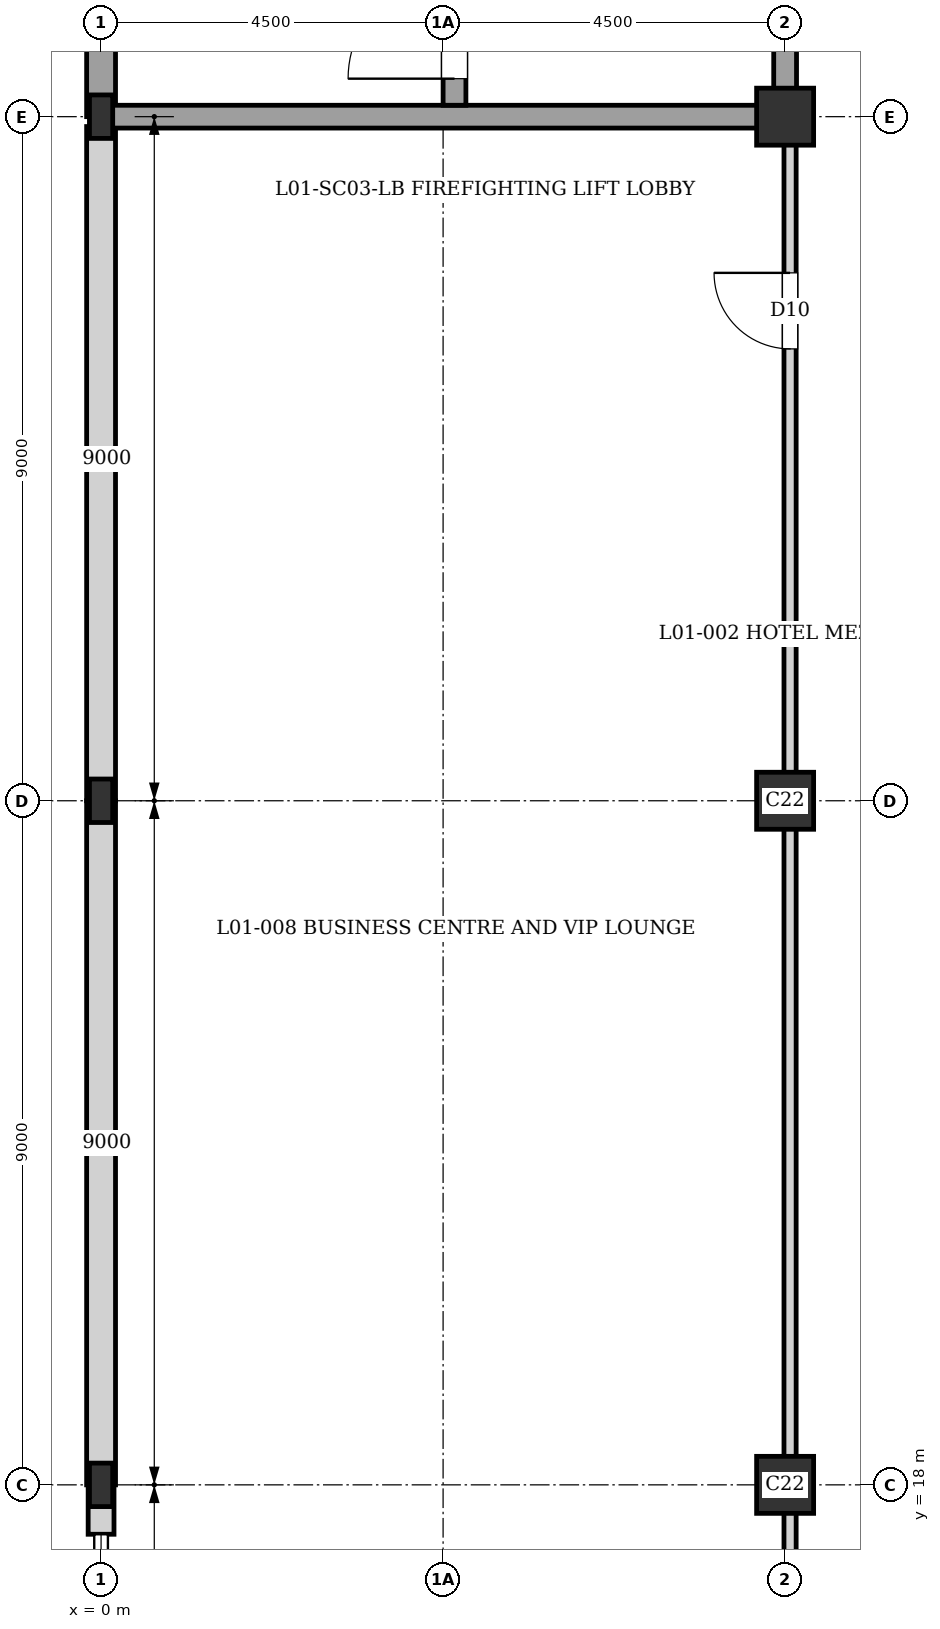
"""IFC4 building model, lengths in metres.
Left out: names, types, materials, properties, quantities, classifications, styles, units other than length and angle.
Written with IfcOpenShell. Run it as: python <this file> out.ifc"""

import sys

from ifc_helpers import new_model, si_unit, direction, frame, frame_2d, origin, origin_2d, place, context, subcontext, project, spatial, rectangle, i_section, extrude, element, fill, save


model = new_model("IFC4")
c1 = context("Model", 3, precision=1e-05, world=origin(), true_north=direction((0.0, 1.0)))
c2 = subcontext(c1, "Body", "Model", "MODEL_VIEW")
j1 = project(units=[si_unit("LENGTHUNIT", "METRE"), si_unit("PLANEANGLEUNIT", "RADIAN")], contexts=[c1])
p1 = place(None, origin())
s1 = spatial("IfcSite", under=j1, at=p1, CompositionType="ELEMENT")
p2 = place(p1, origin())
s2 = spatial("IfcBuilding", under=s1, at=p2, CompositionType="ELEMENT")
p3 = place(p2, frame((0.0, 0.0, 4.32)))
s3 = spatial("IfcBuildingStorey", under=s2, at=p3, CompositionType="ELEMENT", Elevation=4.32)
for number, where, z_axis, x_axis in (
    (1, (0.0, 18.0, 0.0), (0.0, 0.0, 1.0), (1.0, 0.0, 0.0)),
    (2, (0.0, 27.0, 0.0), (0.0, 0.0, 1.0), (1.0, 0.0, 0.0)),
    (3, (0.0, 36.0, 0.0), (0.0, 0.0, 1.0), (1.0, 0.0, 0.0)),
):
    element("IfcColumn", number, at=place(p3, frame(where, z_axis=z_axis, x_axis=x_axis)), inside=s3, PredefinedType="COLUMN", context=c2, shape_type="SweptSolid", body=[
        extrude(i_section(OverallWidth=0.306, OverallDepth=0.572, WebThickness=0.021, FlangeThickness=0.04, at=origin_2d()), origin(), (0.0, 0.0, 1.0), 3.84),
    ])
for number, where, z_axis, x_axis in (
    (4, (9.0, 18.0, 0.0), (0.0, 0.0, 1.0), (1.0, 0.0, 0.0)),
    (5, (9.0, 27.0, 0.0), (0.0, 0.0, 1.0), (1.0, 0.0, 0.0)),
    (6, (9.0, 36.0, 0.0), (0.0, 0.0, 1.0), (1.0, 0.0, 0.0)),
):
    element("IfcColumn", number, at=place(p3, frame(where, z_axis=z_axis, x_axis=x_axis)), inside=s3, PredefinedType="COLUMN", context=c2, shape_type="SweptSolid", body=[
        extrude(rectangle(XDim=0.75, YDim=0.75, at=origin_2d()), origin(), (0.0, 0.0, 1.0), 3.84),
    ])
p4 = place(p3, frame((0.0, 17.35, 0.0), z_axis=(0.0, 0.0, 1.0), x_axis=(0.0, 1.0, 0.0)))
e7 = element("IfcWall", 7, at=p4, inside=s3, PredefinedType="SOLIDWALL", context=c2, shape_type="SweptSolid", body=[
    extrude(rectangle(XDim=0.65, YDim=0.34, at=frame_2d((0.325, 0.0))), origin(), (0.0, 0.0, 1.0), 3.28),
])
p5 = place(p3, frame((0.0, 18.0, 0.0), z_axis=(0.0, 0.0, 1.0), x_axis=(0.0, 1.0, 0.0)))
e8 = element("IfcWall", 8, at=p5, inside=s3, PredefinedType="SOLIDWALL", context=c2, shape_type="SweptSolid", body=[
    extrude(rectangle(XDim=9.0, YDim=0.38, at=frame_2d((4.5, 0.0))), origin(), (0.0, 0.0, 1.0), 1.98),
])
p6 = place(p3, frame((0.0, 27.0, 0.0), z_axis=(0.0, 0.0, 1.0), x_axis=(0.0, 1.0, 0.0)))
e9 = element("IfcWall", 9, at=p6, inside=s3, PredefinedType="SOLIDWALL", context=c2, shape_type="SweptSolid", body=[
    extrude(rectangle(XDim=8.87, YDim=0.38, at=frame_2d((4.435, 0.0))), origin(), (0.0, 0.0, 1.0), 1.98),
])
p7 = place(p3, frame((0.0, 36.0, 0.0), z_axis=(0.0, 0.0, 1.0), x_axis=(0.0, 1.0, 0.0)))
e10 = element("IfcWall", 10, at=p7, inside=s3, PredefinedType="SOLIDWALL", context=c2, shape_type="SweptSolid", body=[
    extrude(rectangle(XDim=9.0, YDim=0.38, at=frame_2d((4.5, 0.0))), origin(), (0.0, 0.0, 1.0), 3.6),
])
p8 = place(p3, frame((0.0, 36.0, 0.0), z_axis=(0.0, 0.0, 1.0), x_axis=(1.0, 0.0, 0.0)))
e11 = element("IfcWall", 11, at=p8, inside=s3, PredefinedType="SHEAR", context=c2, shape_type="SweptSolid", body=[
    extrude(rectangle(XDim=9.0, YDim=0.3, at=frame_2d((4.5, 0.0))), origin(), (0.0, 0.0, 1.0), 3.6),
])
p9 = place(p3, frame((9.0, 36.0, 0.0), z_axis=(0.0, 0.0, 1.0), x_axis=(0.0, 1.0, 0.0)))
e12 = element("IfcWall", 12, at=p9, inside=s3, PredefinedType="SHEAR", context=c2, shape_type="SweptSolid", body=[
    extrude(rectangle(XDim=9.0, YDim=0.3, at=frame_2d((4.5, 0.0))), origin(), (0.0, 0.0, 1.0), 3.6),
])
p10 = place(p9, frame((1.95, 0.0, 0.0)))
e13 = element("IfcOpeningElement", 13, at=p10, cuts=e12, PredefinedType="OPENING", context=c2, shape_type="SweptSolid", body=[
    extrude(rectangle(XDim=1.6, YDim=2.1, at=frame_2d((0.8, 1.05))), frame((0.0, 0.16, 0.0), z_axis=(0.0, -1.0, 0.0), x_axis=(1.0, 0.0, 0.0)), (0.0, 0.0, 1.0), 0.32),
])
p11 = place(p3, frame((4.65, 36.15, 0.0), z_axis=(0.0, 0.0, 1.0), x_axis=(0.0, 1.0, 0.0)))
e14 = element("IfcWall", 14, at=p11, inside=s3, PredefinedType="SHEAR", context=c2, shape_type="SweptSolid", body=[
    extrude(rectangle(XDim=8.7, YDim=0.3, at=frame_2d((4.35, 0.0))), origin(), (0.0, 0.0, 1.0), 3.6),
])
p12 = place(p11, frame((0.35, 0.0, 0.0)))
e15 = element("IfcOpeningElement", 15, at=p12, cuts=e14, PredefinedType="OPENING", context=c2, shape_type="SweptSolid", body=[
    extrude(rectangle(XDim=1.4, YDim=2.02, at=frame_2d((0.7, 1.01))), frame((0.0, 0.16, 0.0), z_axis=(0.0, -1.0, 0.0), x_axis=(1.0, 0.0, 0.0)), (0.0, 0.0, 1.0), 0.32),
])
p13 = place(p3, frame((9.065, 12.305, 0.0), z_axis=(0.0, 0.0, 1.0), x_axis=(0.0, 1.0, 0.0)))
e16 = element("IfcWall", 16, at=p13, inside=s3, PredefinedType="PARTITIONING", context=c2, shape_type="SweptSolid", body=[
    extrude(rectangle(XDim=5.425, YDim=0.16, at=frame_2d((2.712, 0.0))), origin(), (0.0, 0.0, 1.0), 2.99),
])
p14 = place(p13, frame((1.562, 0.0, 0.0)))
e17 = element("IfcOpeningElement", 17, at=p14, cuts=e16, PredefinedType="OPENING", context=c2, shape_type="SweptSolid", body=[
    extrude(rectangle(XDim=1.0, YDim=2.1, at=frame_2d((0.5, 1.05))), frame((0.0, 0.09, 0.0), z_axis=(0.0, -1.0, 0.0), x_axis=(1.0, 0.0, 0.0)), (0.0, 0.0, 1.0), 0.18),
])
p15 = place(p3, frame((9.065, 18.07, 0.0), z_axis=(0.0, 0.0, 1.0), x_axis=(0.0, 1.0, 0.0)))
e18 = element("IfcWall", 18, at=p15, inside=s3, PredefinedType="PARTITIONING", context=c2, shape_type="SweptSolid", body=[
    extrude(rectangle(XDim=8.95, YDim=0.16, at=frame_2d((4.475, 0.0))), origin(), (0.0, 0.0, 1.0), 2.89),
])
p16 = place(p3, frame((9.065, 27.02, 0.0), z_axis=(0.0, 0.0, 1.0), x_axis=(0.0, 1.0, 0.0)))
e19 = element("IfcWall", 19, at=p16, inside=s3, PredefinedType="PARTITIONING", context=c2, shape_type="SweptSolid", body=[
    extrude(rectangle(XDim=8.825, YDim=0.16, at=frame_2d((4.413, 0.0))), origin(), (0.0, 0.0, 1.0), 3.29),
])
p17 = place(p16, frame((5.925, 0.0, 0.0)))
e20 = element("IfcOpeningElement", 20, at=p17, cuts=e19, PredefinedType="OPENING", context=c2, shape_type="SweptSolid", body=[
    extrude(rectangle(XDim=1.0, YDim=2.1, at=frame_2d((0.5, 1.05))), frame((0.0, 0.09, 0.0), z_axis=(0.0, -1.0, 0.0), x_axis=(1.0, 0.0, 0.0)), (0.0, 0.0, 1.0), 0.18),
])
p18 = place(p12, origin())
e21 = element("IfcDoor", 21, at=p18, inside=s3, OperationType="SINGLE_SWING_LEFT", PredefinedType="DOOR", context=c2, shape_type="SweptSolid", body=[
    extrude(rectangle(XDim=1.4, YDim=2.02, at=frame_2d((0.7, 1.01))), frame((0.0, 0.025, 0.0), z_axis=(0.0, -1.0, 0.0), x_axis=(1.0, 0.0, 0.0)), (0.0, 0.0, 1.0), 0.05),
])
fill(e15, e21)
p19 = place(p17, origin())
e22 = element("IfcDoor", 22, at=p19, inside=s3, OperationType="SINGLE_SWING_RIGHT", PredefinedType="DOOR", context=c2, shape_type="SweptSolid", body=[
    extrude(rectangle(XDim=1.0, YDim=2.1, at=frame_2d((0.5, 1.05))), frame((0.0, 0.025, 0.0), z_axis=(0.0, -1.0, 0.0), x_axis=(1.0, 0.0, 0.0)), (0.0, 0.0, 1.0), 0.05),
])
fill(e20, e22)
save(model, sys.argv[1])
